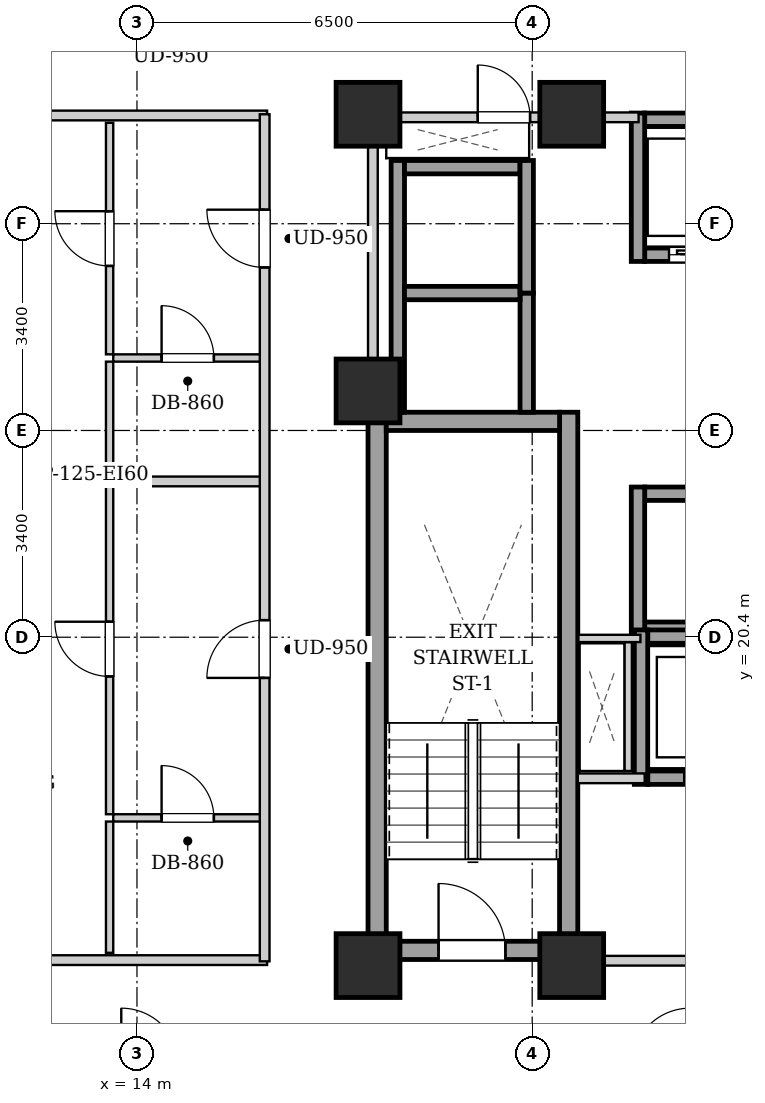
"""IFC4 building model, lengths in metres.
Left out: names, types, materials, properties, quantities, classifications, styles, units other than length and angle.
Written with IfcOpenShell. Run it as: python <this file> out.ifc"""

import sys

from ifc_helpers import new_model, si_unit, direction, frame, frame_2d, origin, origin_2d, place, context, subcontext, project, spatial, rectangle, extrude, element, fill, save


model = new_model("IFC4")
c1 = context("Model", 3, precision=1e-05, world=origin(), true_north=direction((0.0, 1.0)))
c2 = subcontext(c1, "Body", "Model", "MODEL_VIEW")
j1 = project(units=[si_unit("LENGTHUNIT", "METRE"), si_unit("PLANEANGLEUNIT", "RADIAN")], contexts=[c1])
p1 = place(None, origin())
s1 = spatial("IfcSite", under=j1, at=p1, CompositionType="ELEMENT")
p2 = place(p1, origin())
s2 = spatial("IfcBuilding", under=s1, at=p2, CompositionType="ELEMENT")
p3 = place(p2, frame((0.0, 0.0, 116.7)))
s3 = spatial("IfcBuildingStorey", under=s2, at=p3, CompositionType="ELEMENT", Elevation=116.7)
for number, where, z_axis, x_axis in (
    (1, (17.8, 15.0, 0.0), (0.0, 0.0, 1.0), (1.0, 0.0, 0.0)),
    (2, (21.15, 15.0, 0.0), (0.0, 0.0, 1.0), (1.0, 0.0, 0.0)),
    (3, (17.8, 29.0, 0.0), (0.0, 0.0, 1.0), (1.0, 0.0, 0.0)),
    (4, (21.15, 29.0, 0.0), (0.0, 0.0, 1.0), (1.0, 0.0, 0.0)),
    (5, (17.8, 24.45, 0.0), (0.0, 0.0, 1.0), (1.0, 0.0, 0.0)),
):
    element("IfcColumn", number, at=place(p3, frame(where, z_axis=z_axis, x_axis=x_axis)), inside=s3, PredefinedType="COLUMN", context=c2, shape_type="SweptSolid", body=[
        extrude(rectangle(XDim=1.05, YDim=1.05, at=origin_2d()), origin(), (0.0, 0.0, 1.0), 3.2),
    ])
for number, where, z_axis, x_axis in (
    (6, (17.95, 15.1, 0.0), (0.0, 0.0, 1.0), (0.0, 1.0, 0.0)),
    (7, (21.1, 15.1, 0.0), (0.0, 0.0, 1.0), (0.0, 1.0, 0.0)),
):
    element("IfcWall", number, at=place(p3, frame(where, z_axis=z_axis, x_axis=x_axis)), inside=s3, PredefinedType="SHEAR", context=c2, shape_type="SweptSolid", body=[
        extrude(rectangle(XDim=9.0, YDim=0.3, at=frame_2d((4.5, 0.0))), origin(), (0.0, 0.0, 1.0), 2.88),
    ])
p4 = place(p3, frame((18.1, 23.95, 0.0), z_axis=(0.0, 0.0, 1.0), x_axis=(1.0, 0.0, 0.0)))
e8 = element("IfcWall", 8, at=p4, inside=s3, PredefinedType="SHEAR", context=c2, shape_type="SweptSolid", body=[
    extrude(rectangle(XDim=2.85, YDim=0.3, at=frame_2d((1.425, 0.0))), origin(), (0.0, 0.0, 1.0), 2.88),
])
p5 = place(p3, frame((18.1, 15.25, 0.0), z_axis=(0.0, 0.0, 1.0), x_axis=(1.0, 0.0, 0.0)))
e9 = element("IfcWall", 9, at=p5, inside=s3, PredefinedType="SHEAR", context=c2, shape_type="SweptSolid", body=[
    extrude(rectangle(XDim=2.85, YDim=0.3, at=frame_2d((1.425, 0.0))), origin(), (0.0, 0.0, 1.0), 2.88),
])
p6 = place(p5, frame((0.86, 0.0, 0.0)))
e10 = element("IfcOpeningElement", 10, at=p6, cuts=e9, PredefinedType="OPENING", context=c2, shape_type="SweptSolid", body=[
    extrude(rectangle(XDim=1.1, YDim=2.05, at=frame_2d((0.55, 1.025))), frame((0.0, 0.16, 0.0), z_axis=(0.0, -1.0, 0.0), x_axis=(1.0, 0.0, 0.0)), (0.0, 0.0, 1.0), 0.32),
])
p7 = place(p3, frame((22.35, 26.69, 0.0), z_axis=(0.0, 0.0, 1.0), x_axis=(1.0, 0.0, 0.0)))
e11 = element("IfcWall", 11, at=p7, inside=s3, PredefinedType="SHEAR", context=c2, shape_type="SweptSolid", body=[
    extrude(rectangle(XDim=1.9, YDim=0.22, at=frame_2d((0.95, 0.0))), origin(), (0.0, 0.0, 1.0), 2.88),
])
p8 = place(p7, frame((0.4, 0.0, 0.0)))
e12 = element("IfcOpeningElement", 12, at=p8, cuts=e11, PredefinedType="OPENING", context=c2, shape_type="SweptSolid", body=[
    extrude(rectangle(XDim=1.1, YDim=2.15, at=frame_2d((0.55, 1.075))), frame((0.0, 0.12, 0.0), z_axis=(0.0, -1.0, 0.0), x_axis=(1.0, 0.0, 0.0)), (0.0, 0.0, 1.0), 0.24),
])
p9 = place(p3, frame((22.35, 28.91, 0.0), z_axis=(0.0, 0.0, 1.0), x_axis=(1.0, 0.0, 0.0)))
e13 = element("IfcWall", 13, at=p9, inside=s3, PredefinedType="SHEAR", context=c2, shape_type="SweptSolid", body=[
    extrude(rectangle(XDim=1.9, YDim=0.22, at=frame_2d((0.95, 0.0))), origin(), (0.0, 0.0, 1.0), 2.88),
])
p10 = place(p3, frame((22.24, 26.58, 0.0), z_axis=(0.0, 0.0, 1.0), x_axis=(0.0, 1.0, 0.0)))
e14 = element("IfcWall", 14, at=p10, inside=s3, PredefinedType="SHEAR", context=c2, shape_type="SweptSolid", body=[
    extrude(rectangle(XDim=2.44, YDim=0.22, at=frame_2d((1.22, 0.0))), origin(), (0.0, 0.0, 1.0), 2.88),
])
for number, where, z_axis, x_axis in (
    (15, (22.35, 20.54, 0.0), (0.0, 0.0, 1.0), (1.0, 0.0, 0.0)),
    (16, (22.35, 22.76, 0.0), (0.0, 0.0, 1.0), (1.0, 0.0, 0.0)),
):
    element("IfcWall", number, at=place(p3, frame(where, z_axis=z_axis, x_axis=x_axis)), inside=s3, PredefinedType="SHEAR", context=c2, shape_type="SweptSolid", body=[
        extrude(rectangle(XDim=1.9, YDim=0.22, at=frame_2d((0.95, 0.0))), origin(), (0.0, 0.0, 1.0), 2.88),
    ])
p11 = place(p3, frame((22.24, 20.43, 0.0), z_axis=(0.0, 0.0, 1.0), x_axis=(0.0, 1.0, 0.0)))
e17 = element("IfcWall", 17, at=p11, inside=s3, PredefinedType="SHEAR", context=c2, shape_type="SweptSolid", body=[
    extrude(rectangle(XDim=2.44, YDim=0.22, at=frame_2d((1.22, 0.0))), origin(), (0.0, 0.0, 1.0), 2.88),
])
p12 = place(p3, frame((18.29, 24.1, 0.0), z_axis=(0.0, 0.0, 1.0), x_axis=(0.0, 1.0, 0.0)))
e18 = element("IfcWall", 18, at=p12, inside=s3, PredefinedType="SHEAR", context=c2, shape_type="SweptSolid", body=[
    extrude(rectangle(XDim=4.14, YDim=0.22, at=frame_2d((2.07, 0.0))), origin(), (0.0, 0.0, 1.0), 2.88),
])
p13 = place(p3, frame((20.41, 24.1, 0.0), z_axis=(0.0, 0.0, 1.0), x_axis=(0.0, 1.0, 0.0)))
e19 = element("IfcWall", 19, at=p13, inside=s3, PredefinedType="SHEAR", context=c2, shape_type="SweptSolid", body=[
    extrude(rectangle(XDim=1.96, YDim=0.22, at=frame_2d((0.98, 0.0))), origin(), (0.0, 0.0, 1.0), 2.88),
])
for number, where, z_axis, x_axis in (
    (20, (18.4, 26.06, 0.0), (0.0, 0.0, 1.0), (1.0, 0.0, 0.0)),
    (21, (18.4, 28.13, 0.0), (0.0, 0.0, 1.0), (1.0, 0.0, 0.0)),
):
    element("IfcWall", number, at=place(p3, frame(where, z_axis=z_axis, x_axis=x_axis)), inside=s3, PredefinedType="SHEAR", context=c2, shape_type="SweptSolid", body=[
        extrude(rectangle(XDim=1.9, YDim=0.22, at=frame_2d((0.95, 0.0))), origin(), (0.0, 0.0, 1.0), 2.88),
    ])
p14 = place(p3, frame((20.41, 26.06, 0.0), z_axis=(0.0, 0.0, 1.0), x_axis=(0.0, 1.0, 0.0)))
e22 = element("IfcWall", 22, at=p14, inside=s3, PredefinedType="SHEAR", context=c2, shape_type="SweptSolid", body=[
    extrude(rectangle(XDim=2.18, YDim=0.22, at=frame_2d((1.09, 0.0))), origin(), (0.0, 0.0, 1.0), 2.88),
])
p15 = place(p3, frame((22.4, 18.09, 0.0), z_axis=(0.0, 0.0, 1.0), x_axis=(1.0, 0.0, 0.0)))
e23 = element("IfcWall", 23, at=p15, inside=s3, PredefinedType="SHEAR", context=c2, shape_type="SweptSolid", body=[
    extrude(rectangle(XDim=2.4, YDim=0.22, at=frame_2d((1.2, 0.0))), origin(), (0.0, 0.0, 1.0), 2.88),
])
p16 = place(p15, frame((0.6, 0.0, 0.0)))
e24 = element("IfcOpeningElement", 24, at=p16, cuts=e23, PredefinedType="OPENING", context=c2, shape_type="SweptSolid", body=[
    extrude(rectangle(XDim=1.2, YDim=2.15, at=frame_2d((0.6, 1.075))), frame((0.0, 0.12, 0.0), z_axis=(0.0, -1.0, 0.0), x_axis=(1.0, 0.0, 0.0)), (0.0, 0.0, 1.0), 0.24),
])
p17 = place(p3, frame((22.4, 20.41, 0.0), z_axis=(0.0, 0.0, 1.0), x_axis=(1.0, 0.0, 0.0)))
e25 = element("IfcWall", 25, at=p17, inside=s3, PredefinedType="SHEAR", context=c2, shape_type="SweptSolid", body=[
    extrude(rectangle(XDim=2.4, YDim=0.22, at=frame_2d((1.2, 0.0))), origin(), (0.0, 0.0, 1.0), 2.88),
])
p18 = place(p3, frame((22.29, 17.98, 0.0), z_axis=(0.0, 0.0, 1.0), x_axis=(0.0, 1.0, 0.0)))
e26 = element("IfcWall", 26, at=p18, inside=s3, PredefinedType="SHEAR", context=c2, shape_type="SweptSolid", body=[
    extrude(rectangle(XDim=2.54, YDim=0.22, at=frame_2d((1.27, 0.0))), origin(), (0.0, 0.0, 1.0), 2.88),
])
p19 = place(p3, frame((21.25, 15.08, 0.0), z_axis=(0.0, 0.0, 1.0), x_axis=(1.0, 0.0, 0.0)))
e27 = element("IfcWall", 27, at=p19, inside=s3, PredefinedType="PARTITIONING", context=c2, shape_type="SweptSolid", body=[
    extrude(rectangle(XDim=8.5, YDim=0.16, at=frame_2d((4.25, 0.0))), origin(), (0.0, 0.0, 1.0), 2.253),
])
p20 = place(p19, frame((3.725, 0.0, 0.0)))
e28 = element("IfcOpeningElement", 28, at=p20, cuts=e27, PredefinedType="OPENING", context=c2, shape_type="SweptSolid", body=[
    extrude(rectangle(XDim=1.05, YDim=2.05, at=frame_2d((0.525, 1.025))), frame((0.0, 0.09, 0.0), z_axis=(0.0, -1.0, 0.0), x_axis=(1.0, 0.0, 0.0)), (0.0, 0.0, 1.0), 0.18),
])
p21 = place(p3, frame((21.25, 18.08, 0.0), z_axis=(0.0, 0.0, 1.0), x_axis=(1.0, 0.0, 0.0)))
e29 = element("IfcWall", 29, at=p21, inside=s3, PredefinedType="PARTITIONING", context=c2, shape_type="SweptSolid", body=[
    extrude(rectangle(XDim=1.1, YDim=0.16, at=frame_2d((0.55, 0.0))), origin(), (0.0, 0.0, 1.0), 2.88),
])
p22 = place(p3, frame((17.88, 24.12, 0.0), z_axis=(0.0, 0.0, 1.0), x_axis=(0.0, 1.0, 0.0)))
e30 = element("IfcWall", 30, at=p22, inside=s3, PredefinedType="PARTITIONING", context=c2, shape_type="SweptSolid", body=[
    extrude(rectangle(XDim=4.76, YDim=0.16, at=frame_2d((2.38, 0.0))), origin(), (0.0, 0.0, 1.0), 2.215),
])
p23 = place(p3, frame((17.96, 28.95, 0.0), z_axis=(0.0, 0.0, 1.0), x_axis=(1.0, 0.0, 0.0)))
e31 = element("IfcWall", 31, at=p23, inside=s3, PredefinedType="PARTITIONING", context=c2, shape_type="SweptSolid", body=[
    extrude(rectangle(XDim=4.29, YDim=0.16, at=frame_2d((2.145, 0.0))), origin(), (0.0, 0.0, 1.0), 2.253),
])
p24 = place(p23, frame((1.645, 0.0, 0.0)))
e32 = element("IfcOpeningElement", 32, at=p24, cuts=e31, PredefinedType="OPENING", context=c2, shape_type="SweptSolid", body=[
    extrude(rectangle(XDim=0.86, YDim=2.05, at=frame_2d((0.43, 1.025))), frame((0.0, 0.09, 0.0), z_axis=(0.0, -1.0, 0.0), x_axis=(1.0, 0.0, 0.0)), (0.0, 0.0, 1.0), 0.18),
])
p25 = place(p3, frame((22.08, 18.2, 0.0), z_axis=(0.0, 0.0, 1.0), x_axis=(0.0, 1.0, 0.0)))
e33 = element("IfcWall", 33, at=p25, inside=s3, PredefinedType="PARTITIONING", context=c2, shape_type="SweptSolid", body=[
    extrude(rectangle(XDim=2.12, YDim=0.12, at=frame_2d((1.06, 0.0))), origin(), (0.0, 0.0, 1.0), 2.88),
])
p26 = place(p3, frame((22.28, 20.38, 0.0), z_axis=(0.0, 0.0, 1.0), x_axis=(-1.0, 0.0, 0.0)))
e34 = element("IfcWall", 34, at=p26, inside=s3, PredefinedType="PARTITIONING", context=c2, shape_type="SweptSolid", body=[
    extrude(rectangle(XDim=1.02, YDim=0.12, at=frame_2d((0.51, 0.0))), origin(), (0.0, 0.0, 1.0), 2.88),
])
for number, where, z_axis, x_axis in (
    (35, (7.78, 15.09, 0.0), (0.0, 0.0, 1.0), (1.0, 0.0, 0.0)),
    (36, (7.78, 28.98, 0.0), (0.0, 0.0, 1.0), (1.0, 0.0, 0.0)),
):
    element("IfcWall", number, at=place(p3, frame(where, z_axis=z_axis, x_axis=x_axis)), inside=s3, PredefinedType="PARTITIONING", context=c2, shape_type="SweptSolid", body=[
        extrude(rectangle(XDim=8.36, YDim=0.16, at=frame_2d((4.18, 0.0))), origin(), (0.0, 0.0, 1.0), 2.253),
    ])
p27 = place(p3, frame((7.78, 22.962, 0.0), z_axis=(0.0, 0.0, 1.0), x_axis=(1.0, 0.0, 0.0)))
e37 = element("IfcWall", 37, at=p27, inside=s3, PredefinedType="PARTITIONING", context=c2, shape_type="SweptSolid", body=[
    extrude(rectangle(XDim=8.28, YDim=0.16, at=frame_2d((4.14, 0.0))), origin(), (0.0, 0.0, 1.0), 2.88),
])
p28 = place(p3, frame((13.61, 17.429, 0.0), z_axis=(0.0, 0.0, 1.0), x_axis=(1.0, 0.0, 0.0)))
e38 = element("IfcWall", 38, at=p28, inside=s3, PredefinedType="PARTITIONING", context=c2, shape_type="SweptSolid", body=[
    extrude(rectangle(XDim=2.45, YDim=0.12, at=frame_2d((1.225, 0.0))), origin(), (0.0, 0.0, 1.0), 2.88),
])
p29 = place(p28, frame((0.795, 0.0, 0.0)))
e39 = element("IfcOpeningElement", 39, at=p29, cuts=e38, PredefinedType="OPENING", context=c2, shape_type="SweptSolid", body=[
    extrude(rectangle(XDim=0.86, YDim=2.05, at=frame_2d((0.43, 1.025))), frame((0.0, 0.07, 0.0), z_axis=(0.0, -1.0, 0.0), x_axis=(1.0, 0.0, 0.0)), (0.0, 0.0, 1.0), 0.14),
])
p30 = place(p3, frame((13.55, 15.21, 0.0), z_axis=(0.0, 0.0, 1.0), x_axis=(0.0, 1.0, 0.0)))
e40 = element("IfcWall", 40, at=p30, inside=s3, PredefinedType="PARTITIONING", context=c2, shape_type="SweptSolid", body=[
    extrude(rectangle(XDim=2.159, YDim=0.12, at=frame_2d((1.08, 0.0))), origin(), (0.0, 0.0, 1.0), 2.88),
])
p31 = place(p3, frame((13.55, 17.489, 0.0), z_axis=(0.0, 0.0, 1.0), x_axis=(0.0, 1.0, 0.0)))
e41 = element("IfcWall", 41, at=p31, inside=s3, PredefinedType="PARTITIONING", context=c2, shape_type="SweptSolid", body=[
    extrude(rectangle(XDim=5.433, YDim=0.12, at=frame_2d((2.717, 0.0))), origin(), (0.0, 0.0, 1.0), 2.88),
])
p32 = place(p31, frame((2.266, 0.0, 0.0)))
e42 = element("IfcOpeningElement", 42, at=p32, cuts=e41, PredefinedType="OPENING", context=c2, shape_type="SweptSolid", body=[
    extrude(rectangle(XDim=0.9, YDim=2.05, at=frame_2d((0.45, 1.025))), frame((0.0, 0.07, 0.0), z_axis=(0.0, -1.0, 0.0), x_axis=(1.0, 0.0, 0.0)), (0.0, 0.0, 1.0), 0.14),
])
p33 = place(p3, frame((13.61, 24.992, 0.0), z_axis=(0.0, 0.0, 1.0), x_axis=(1.0, 0.0, 0.0)))
e43 = element("IfcWall", 43, at=p33, inside=s3, PredefinedType="PARTITIONING", context=c2, shape_type="SweptSolid", body=[
    extrude(rectangle(XDim=2.45, YDim=0.12, at=frame_2d((1.225, 0.0))), origin(), (0.0, 0.0, 1.0), 2.88),
])
p34 = place(p33, frame((0.795, 0.0, 0.0)))
e44 = element("IfcOpeningElement", 44, at=p34, cuts=e43, PredefinedType="OPENING", context=c2, shape_type="SweptSolid", body=[
    extrude(rectangle(XDim=0.86, YDim=2.05, at=frame_2d((0.43, 1.025))), frame((0.0, 0.07, 0.0), z_axis=(0.0, -1.0, 0.0), x_axis=(1.0, 0.0, 0.0)), (0.0, 0.0, 1.0), 0.14),
])
p35 = place(p3, frame((13.55, 23.082, 0.0), z_axis=(0.0, 0.0, 1.0), x_axis=(0.0, 1.0, 0.0)))
e45 = element("IfcWall", 45, at=p35, inside=s3, PredefinedType="PARTITIONING", context=c2, shape_type="SweptSolid", body=[
    extrude(rectangle(XDim=1.85, YDim=0.12, at=frame_2d((0.925, 0.0))), origin(), (0.0, 0.0, 1.0), 2.88),
])
p36 = place(p3, frame((13.55, 25.052, 0.0), z_axis=(0.0, 0.0, 1.0), x_axis=(0.0, 1.0, 0.0)))
e46 = element("IfcWall", 46, at=p36, inside=s3, PredefinedType="PARTITIONING", context=c2, shape_type="SweptSolid", body=[
    extrude(rectangle(XDim=3.808, YDim=0.12, at=frame_2d((1.904, 0.0))), origin(), (0.0, 0.0, 1.0), 2.88),
])
p37 = place(p36, frame((1.454, 0.0, 0.0)))
e47 = element("IfcOpeningElement", 47, at=p37, cuts=e46, PredefinedType="OPENING", context=c2, shape_type="SweptSolid", body=[
    extrude(rectangle(XDim=0.9, YDim=2.05, at=frame_2d((0.45, 1.025))), frame((0.0, 0.07, 0.0), z_axis=(0.0, -1.0, 0.0), x_axis=(1.0, 0.0, 0.0)), (0.0, 0.0, 1.0), 0.14),
])
p38 = place(p3, frame((16.1, 15.07, 0.0), z_axis=(0.0, 0.0, 1.0), x_axis=(0.0, 1.0, 0.0)))
e48 = element("IfcWall", 48, at=p38, inside=s3, PredefinedType="PARTITIONING", context=c2, shape_type="SweptSolid", body=[
    extrude(rectangle(XDim=13.93, YDim=0.16, at=frame_2d((6.965, 0.0))), origin(), (0.0, 0.0, 1.0), 2.88),
])
p39 = place(p38, frame((4.661, 0.0, 0.0)))
e49 = element("IfcOpeningElement", 49, at=p39, cuts=e48, PredefinedType="OPENING", context=c2, shape_type="SweptSolid", body=[
    extrude(rectangle(XDim=0.95, YDim=2.1, at=frame_2d((0.475, 1.05))), frame((0.0, 0.09, 0.0), z_axis=(0.0, -1.0, 0.0), x_axis=(1.0, 0.0, 0.0)), (0.0, 0.0, 1.0), 0.18),
])
p40 = place(p38, frame((11.411, 0.0, 0.0)))
e50 = element("IfcOpeningElement", 50, at=p40, cuts=e48, PredefinedType="OPENING", context=c2, shape_type="SweptSolid", body=[
    extrude(rectangle(XDim=0.95, YDim=2.1, at=frame_2d((0.475, 1.05))), frame((0.0, 0.09, 0.0), z_axis=(0.0, -1.0, 0.0), x_axis=(1.0, 0.0, 0.0)), (0.0, 0.0, 1.0), 0.18),
])
p41 = place(p6, origin())
e51 = element("IfcDoor", 51, at=p41, inside=s3, OperationType="SINGLE_SWING_LEFT", PredefinedType="DOOR", context=c2, shape_type="SweptSolid", body=[
    extrude(rectangle(XDim=1.1, YDim=2.05, at=frame_2d((0.55, 1.025))), frame((0.0, 0.025, 0.0), z_axis=(0.0, -1.0, 0.0), x_axis=(1.0, 0.0, 0.0)), (0.0, 0.0, 1.0), 0.05),
])
fill(e10, e51)
p42 = place(p8, origin())
e52 = element("IfcDoor", 52, at=p42, inside=s3, OperationType="SLIDING_TO_LEFT", PredefinedType="DOOR", context=c2, shape_type="SweptSolid", body=[
    extrude(rectangle(XDim=1.1, YDim=2.15, at=frame_2d((0.55, 1.075))), frame((0.0, 0.025, 0.0), z_axis=(0.0, -1.0, 0.0), x_axis=(1.0, 0.0, 0.0)), (0.0, 0.0, 1.0), 0.05),
])
fill(e12, e52)
p43 = place(p16, origin())
e53 = element("IfcDoor", 53, at=p43, inside=s3, OperationType="SLIDING_TO_LEFT", PredefinedType="DOOR", context=c2, shape_type="SweptSolid", body=[
    extrude(rectangle(XDim=1.2, YDim=2.15, at=frame_2d((0.6, 1.075))), frame((0.0, 0.025, 0.0), z_axis=(0.0, -1.0, 0.0), x_axis=(1.0, 0.0, 0.0)), (0.0, 0.0, 1.0), 0.05),
])
fill(e24, e53)
p44 = place(p24, origin())
e54 = element("IfcDoor", 54, at=p44, inside=s3, OperationType="SINGLE_SWING_LEFT", PredefinedType="DOOR", context=c2, shape_type="SweptSolid", body=[
    extrude(rectangle(XDim=0.86, YDim=2.05, at=frame_2d((0.43, 1.025))), frame((0.0, 0.025, 0.0), z_axis=(0.0, -1.0, 0.0), x_axis=(1.0, 0.0, 0.0)), (0.0, 0.0, 1.0), 0.05),
])
fill(e32, e54)
p45 = place(p29, origin())
e55 = element("IfcDoor", 55, at=p45, inside=s3, OperationType="SINGLE_SWING_LEFT", PredefinedType="DOOR", context=c2, shape_type="SweptSolid", body=[
    extrude(rectangle(XDim=0.86, YDim=2.05, at=frame_2d((0.43, 1.025))), frame((0.0, 0.025, 0.0), z_axis=(0.0, -1.0, 0.0), x_axis=(1.0, 0.0, 0.0)), (0.0, 0.0, 1.0), 0.05),
])
fill(e39, e55)
p46 = place(p32, origin())
e56 = element("IfcDoor", 56, at=p46, inside=s3, OperationType="SINGLE_SWING_RIGHT", PredefinedType="DOOR", context=c2, shape_type="SweptSolid", body=[
    extrude(rectangle(XDim=0.9, YDim=2.05, at=frame_2d((0.45, 1.025))), frame((0.0, 0.025, 0.0), z_axis=(0.0, -1.0, 0.0), x_axis=(1.0, 0.0, 0.0)), (0.0, 0.0, 1.0), 0.05),
])
fill(e42, e56)
p47 = place(p34, origin())
e57 = element("IfcDoor", 57, at=p47, inside=s3, OperationType="SINGLE_SWING_LEFT", PredefinedType="DOOR", context=c2, shape_type="SweptSolid", body=[
    extrude(rectangle(XDim=0.86, YDim=2.05, at=frame_2d((0.43, 1.025))), frame((0.0, 0.025, 0.0), z_axis=(0.0, -1.0, 0.0), x_axis=(1.0, 0.0, 0.0)), (0.0, 0.0, 1.0), 0.05),
])
fill(e44, e57)
p48 = place(p37, origin())
e58 = element("IfcDoor", 58, at=p48, inside=s3, OperationType="SINGLE_SWING_RIGHT", PredefinedType="DOOR", context=c2, shape_type="SweptSolid", body=[
    extrude(rectangle(XDim=0.9, YDim=2.05, at=frame_2d((0.45, 1.025))), frame((0.0, 0.025, 0.0), z_axis=(0.0, -1.0, 0.0), x_axis=(1.0, 0.0, 0.0)), (0.0, 0.0, 1.0), 0.05),
])
fill(e47, e58)
p49 = place(p39, origin())
e59 = element("IfcDoor", 59, at=p49, inside=s3, OperationType="SINGLE_SWING_LEFT", PredefinedType="DOOR", context=c2, shape_type="SweptSolid", body=[
    extrude(rectangle(XDim=0.95, YDim=2.1, at=frame_2d((0.475, 1.05))), frame((0.0, 0.025, 0.0), z_axis=(0.0, -1.0, 0.0), x_axis=(1.0, 0.0, 0.0)), (0.0, 0.0, 1.0), 0.05),
])
fill(e49, e59)
p50 = place(p40, origin())
e60 = element("IfcDoor", 60, at=p50, inside=s3, OperationType="SINGLE_SWING_RIGHT", PredefinedType="DOOR", context=c2, shape_type="SweptSolid", body=[
    extrude(rectangle(XDim=0.95, YDim=2.1, at=frame_2d((0.475, 1.05))), frame((0.0, 0.025, 0.0), z_axis=(0.0, -1.0, 0.0), x_axis=(1.0, 0.0, 0.0)), (0.0, 0.0, 1.0), 0.05),
])
fill(e50, e60)
save(model, sys.argv[1])
